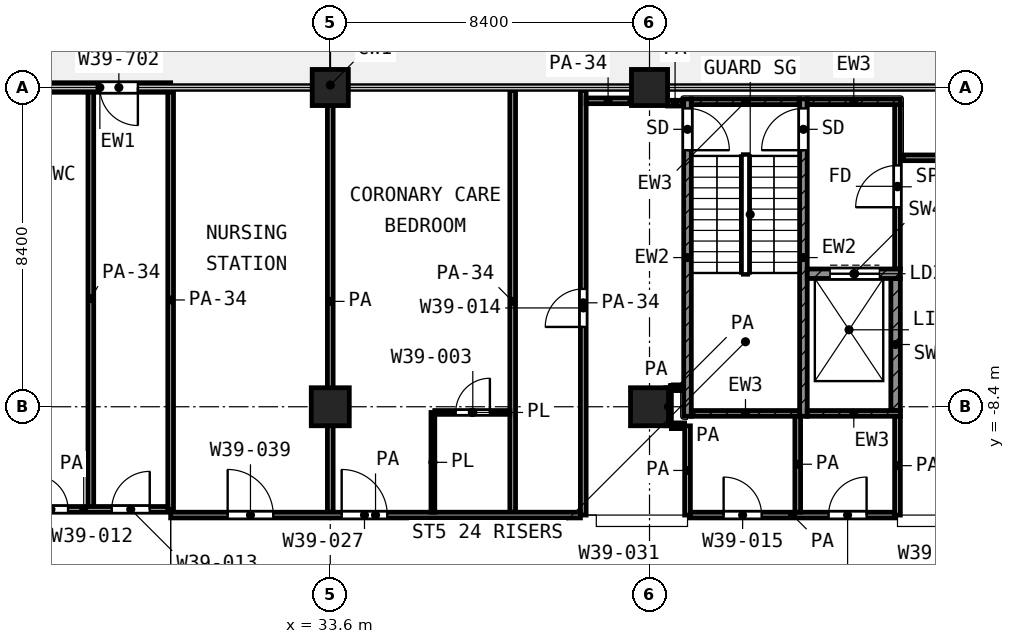
"""IFC4 building model, lengths in metres.
Left out: names, types, materials, properties, quantities, classifications, styles, units other than length and angle.
Written with IfcOpenShell. Run it as: python <this file> out.ifc"""

import sys

from ifc_helpers import new_model, si_unit, direction, frame, frame_2d, origin, origin_2d, place, context, subcontext, project, spatial, rectangle, extrude, element, fill, save


model = new_model("IFC4")
c1 = context("Model", 3, precision=1e-05, world=origin(), true_north=direction((0.0, 1.0)))
c2 = subcontext(c1, "Body", "Model", "MODEL_VIEW")
j1 = project(units=[si_unit("LENGTHUNIT", "METRE"), si_unit("PLANEANGLEUNIT", "RADIAN")], contexts=[c1])
p1 = place(None, origin())
s1 = spatial("IfcSite", under=j1, at=p1, CompositionType="ELEMENT")
p2 = place(p1, origin())
s2 = spatial("IfcBuilding", under=s1, at=p2, CompositionType="ELEMENT")
p3 = place(p2, frame((0.0, 0.0, 192.0)))
s3 = spatial("IfcBuildingStorey", under=s2, at=p3, CompositionType="ELEMENT", Elevation=192.0)
for number, where, z_axis, x_axis in (
    (1, (33.6, 0.0, 0.0), (0.0, 0.0, 1.0), (1.0, 0.0, 0.0)),
    (2, (42.0, 0.0, 0.0), (0.0, 0.0, 1.0), (1.0, 0.0, 0.0)),
):
    element("IfcColumn", number, at=place(p3, frame(where, z_axis=z_axis, x_axis=x_axis)), inside=s3, PredefinedType="COLUMN", context=c2, shape_type="SweptSolid", body=[
        extrude(rectangle(XDim=0.95, YDim=0.95, at=origin_2d()), origin(), (0.0, 0.0, 1.0), 4.2),
    ])
for number, where, z_axis, x_axis in (
    (3, (33.6, -8.4, 0.0), (0.0, 0.0, 1.0), (1.0, 0.0, 0.0)),
    (4, (42.0, -8.4, 0.0), (0.0, 0.0, 1.0), (1.0, 0.0, 0.0)),
):
    element("IfcColumn", number, at=place(p3, frame(where, z_axis=z_axis, x_axis=x_axis)), inside=s3, PredefinedType="COLUMN", context=c2, shape_type="SweptSolid", body=[
        extrude(rectangle(XDim=1.0, YDim=1.0, at=origin_2d()), origin(), (0.0, 0.0, 1.0), 4.2),
    ])
p4 = place(p3, frame((29.4, 0.0, 0.0), z_axis=(0.0, 0.0, 1.0), x_axis=(-1.0, 0.0, 0.0)))
e5 = element("IfcWall", 5, at=p4, inside=s3, PredefinedType="SOLIDWALL", context=c2, shape_type="SweptSolid", body=[
    extrude(rectangle(XDim=3.725, YDim=0.25, at=frame_2d((1.862, 0.0))), origin(), (0.0, 0.0, 1.0), 2.58),
])
p5 = place(p4, frame((0.863, 0.0, 0.0)))
e6 = element("IfcOpeningElement", 6, at=p5, cuts=e5, PredefinedType="OPENING", context=c2, shape_type="SweptSolid", body=[
    extrude(rectangle(XDim=1.0, YDim=2.1, at=frame_2d((0.5, 1.05))), frame((0.0, 0.135, 0.0), z_axis=(0.0, -1.0, 0.0), x_axis=(1.0, 0.0, 0.0)), (0.0, 0.0, 1.0), 0.27),
])
p6 = place(p3, frame((43.0, -8.65, 0.0), z_axis=(0.0, 0.0, 1.0), x_axis=(0.0, 1.0, 0.0)))
e7 = element("IfcWall", 7, at=p6, inside=s3, PredefinedType="SHEAR", context=c2, shape_type="SweptSolid", body=[
    extrude(rectangle(XDim=8.35, YDim=0.2, at=frame_2d((4.175, 0.0))), origin(), (0.0, 0.0, 1.0), 3.6),
])
p7 = place(p6, frame((7.0, 0.0, 0.0)))
e8 = element("IfcOpeningElement", 8, at=p7, cuts=e7, PredefinedType="OPENING", context=c2, shape_type="SweptSolid", body=[
    extrude(rectangle(XDim=1.1, YDim=2.1, at=frame_2d((0.55, 1.05))), frame((0.0, 0.11, 0.0), z_axis=(0.0, -1.0, 0.0), x_axis=(1.0, 0.0, 0.0)), (0.0, 0.0, 1.0), 0.22),
])
p8 = place(p3, frame((46.05, -8.65, 0.0), z_axis=(0.0, 0.0, 1.0), x_axis=(0.0, 1.0, 0.0)))
e9 = element("IfcWall", 9, at=p8, inside=s3, PredefinedType="SHEAR", context=c2, shape_type="SweptSolid", body=[
    extrude(rectangle(XDim=8.35, YDim=0.2, at=frame_2d((4.175, 0.0))), origin(), (0.0, 0.0, 1.0), 3.6),
])
p9 = place(p8, frame((7.0, 0.0, 0.0)))
e10 = element("IfcOpeningElement", 10, at=p9, cuts=e9, PredefinedType="OPENING", context=c2, shape_type="SweptSolid", body=[
    extrude(rectangle(XDim=1.1, YDim=2.1, at=frame_2d((0.55, 1.05))), frame((0.0, 0.11, 0.0), z_axis=(0.0, -1.0, 0.0), x_axis=(1.0, 0.0, 0.0)), (0.0, 0.0, 1.0), 0.22),
])
p10 = place(p3, frame((43.1, -0.375, 0.0), z_axis=(0.0, 0.0, 1.0), x_axis=(1.0, 0.0, 0.0)))
e11 = element("IfcWall", 11, at=p10, inside=s3, PredefinedType="SHEAR", context=c2, shape_type="SweptSolid", body=[
    extrude(rectangle(XDim=2.85, YDim=0.15, at=frame_2d((1.425, 0.0))), origin(), (0.0, 0.0, 1.0), 3.6),
])
p11 = place(p3, frame((46.15, -0.375, 0.0), z_axis=(0.0, 0.0, 1.0), x_axis=(1.0, 0.0, 0.0)))
e12 = element("IfcWall", 12, at=p11, inside=s3, PredefinedType="SHEAR", context=c2, shape_type="SweptSolid", body=[
    extrude(rectangle(XDim=2.45, YDim=0.15, at=frame_2d((1.225, 0.0))), origin(), (0.0, 0.0, 1.0), 3.6),
])
p12 = place(p3, frame((43.1, -8.575, 0.0), z_axis=(0.0, 0.0, 1.0), x_axis=(1.0, 0.0, 0.0)))
e13 = element("IfcWall", 13, at=p12, inside=s3, PredefinedType="SHEAR", context=c2, shape_type="SweptSolid", body=[
    extrude(rectangle(XDim=2.85, YDim=0.15, at=frame_2d((1.425, 0.0))), origin(), (0.0, 0.0, 1.0), 3.6),
])
p13 = place(p3, frame((46.15, -8.575, 0.0), z_axis=(0.0, 0.0, 1.0), x_axis=(1.0, 0.0, 0.0)))
e14 = element("IfcWall", 14, at=p13, inside=s3, PredefinedType="SHEAR", context=c2, shape_type="SweptSolid", body=[
    extrude(rectangle(XDim=2.45, YDim=0.15, at=frame_2d((1.225, 0.0))), origin(), (0.0, 0.0, 1.0), 3.6),
])
p14 = place(p3, frame((46.15, -4.9, 0.0), z_axis=(0.0, 0.0, 1.0), x_axis=(1.0, 0.0, 0.0)))
e15 = element("IfcWall", 15, at=p14, inside=s3, PredefinedType="SHEAR", context=c2, shape_type="SweptSolid", body=[
    extrude(rectangle(XDim=2.45, YDim=0.25, at=frame_2d((1.225, 0.0))), origin(), (0.0, 0.0, 1.0), 3.6),
])
p15 = place(p14, frame((0.6, 0.0, 0.0)))
e16 = element("IfcOpeningElement", 16, at=p15, cuts=e15, PredefinedType="OPENING", context=c2, shape_type="SweptSolid", body=[
    extrude(rectangle(XDim=1.3, YDim=2.1, at=frame_2d((0.65, 1.05))), frame((0.0, 0.135, 0.0), z_axis=(0.0, -1.0, 0.0), x_axis=(1.0, 0.0, 0.0)), (0.0, 0.0, 1.0), 0.27),
])
p16 = place(p3, frame((48.475, -8.5, 0.0), z_axis=(0.0, 0.0, 1.0), x_axis=(0.0, 1.0, 0.0)))
e17 = element("IfcWall", 17, at=p16, inside=s3, PredefinedType="SHEAR", context=c2, shape_type="SweptSolid", body=[
    extrude(rectangle(XDim=3.475, YDim=0.25, at=frame_2d((1.738, 0.0))), origin(), (0.0, 0.0, 1.0), 3.6),
])
p17 = place(p3, frame((48.525, -4.775, 0.0), z_axis=(0.0, 0.0, 1.0), x_axis=(0.0, 1.0, 0.0)))
e18 = element("IfcWall", 18, at=p17, inside=s3, PredefinedType="PARTITIONING", context=c2, shape_type="SweptSolid", body=[
    extrude(rectangle(XDim=4.325, YDim=0.15, at=frame_2d((2.163, 0.0))), origin(), (0.0, 0.0, 1.0), 3.6),
])
p18 = place(p17, frame((1.625, 0.0, 0.0)))
e19 = element("IfcOpeningElement", 19, at=p18, cuts=e18, PredefinedType="OPENING", context=c2, shape_type="SweptSolid", body=[
    extrude(rectangle(XDim=1.1, YDim=2.1, at=frame_2d((0.55, 1.05))), frame((0.0, 0.085, 0.0), z_axis=(0.0, -1.0, 0.0), x_axis=(1.0, 0.0, 0.0)), (0.0, 0.0, 1.0), 0.17),
])
p19 = place(p3, frame((36.35, -8.55, 0.0), z_axis=(0.0, 0.0, 1.0), x_axis=(1.0, 0.0, 0.0)))
e20 = element("IfcWall", 20, at=p19, inside=s3, PredefinedType="PARTITIONING", context=c2, shape_type="SweptSolid", body=[
    extrude(rectangle(XDim=1.975, YDim=0.1, at=frame_2d((0.987, 0.0))), origin(), (0.0, 0.0, 1.0), 3.6),
])
p20 = place(p19, frame((0.55, 0.0, 0.0)))
e21 = element("IfcOpeningElement", 21, at=p20, cuts=e20, PredefinedType="OPENING", context=c2, shape_type="SweptSolid", body=[
    extrude(rectangle(XDim=0.9, YDim=2.1, at=frame_2d((0.45, 1.05))), frame((0.0, 0.06, 0.0), z_axis=(0.0, -1.0, 0.0), x_axis=(1.0, 0.0, 0.0)), (0.0, 0.0, 1.0), 0.12),
])
p21 = place(p3, frame((36.3, -11.175, 0.0), z_axis=(0.0, 0.0, 1.0), x_axis=(0.0, 1.0, 0.0)))
e22 = element("IfcWall", 22, at=p21, inside=s3, PredefinedType="PARTITIONING", context=c2, shape_type="SweptSolid", body=[
    extrude(rectangle(XDim=2.625, YDim=0.1, at=frame_2d((1.312, 0.0))), origin(), (0.0, 0.0, 1.0), 3.6),
])
p22 = place(p3, frame((29.4, -11.25, 0.0), z_axis=(0.0, 0.0, 1.0), x_axis=(1.0, 0.0, 0.0)))
e23 = element("IfcWall", 23, at=p22, inside=s3, PredefinedType="PARTITIONING", context=c2, shape_type="SweptSolid", body=[
    extrude(rectangle(XDim=10.782, YDim=0.15, at=frame_2d((5.391, 0.0))), origin(), (0.0, 0.0, 1.0), 3.6),
])
p23 = place(p22, frame((4.5, 0.0, 0.0)))
e24 = element("IfcOpeningElement", 24, at=p23, cuts=e23, PredefinedType="OPENING", context=c2, shape_type="SweptSolid", body=[
    extrude(rectangle(XDim=1.2, YDim=2.1, at=frame_2d((0.6, 1.05))), frame((0.0, 0.085, 0.0), z_axis=(0.0, -1.0, 0.0), x_axis=(1.0, 0.0, 0.0)), (0.0, 0.0, 1.0), 0.17),
])
p24 = place(p22, frame((1.5, 0.0, 0.0)))
e25 = element("IfcOpeningElement", 25, at=p24, cuts=e23, PredefinedType="OPENING", context=c2, shape_type="SweptSolid", body=[
    extrude(rectangle(XDim=1.2, YDim=2.1, at=frame_2d((0.6, 1.05))), frame((0.0, 0.085, 0.0), z_axis=(0.0, -1.0, 0.0), x_axis=(1.0, 0.0, 0.0)), (0.0, 0.0, 1.0), 0.17),
])
p25 = place(p3, frame((43.075, -11.25, 0.0), z_axis=(0.0, 0.0, 1.0), x_axis=(1.0, 0.0, 0.0)))
e26 = element("IfcWall", 26, at=p25, inside=s3, PredefinedType="PARTITIONING", context=c2, shape_type="SweptSolid", body=[
    extrude(rectangle(XDim=5.375, YDim=0.15, at=frame_2d((2.688, 0.0))), origin(), (0.0, 0.0, 1.0), 3.6),
])
p26 = place(p25, frame((0.875, 0.0, 0.0)))
e27 = element("IfcOpeningElement", 27, at=p26, cuts=e26, PredefinedType="OPENING", context=c2, shape_type="SweptSolid", body=[
    extrude(rectangle(XDim=1.0, YDim=2.1, at=frame_2d((0.5, 1.05))), frame((0.0, 0.085, 0.0), z_axis=(0.0, -1.0, 0.0), x_axis=(1.0, 0.0, 0.0)), (0.0, 0.0, 1.0), 0.17),
])
p27 = place(p25, frame((3.637, 0.0, 0.0)))
e28 = element("IfcOpeningElement", 28, at=p27, cuts=e26, PredefinedType="OPENING", context=c2, shape_type="SweptSolid", body=[
    extrude(rectangle(XDim=1.0, YDim=2.1, at=frame_2d((0.5, 1.05))), frame((0.0, 0.085, 0.0), z_axis=(0.0, -1.0, 0.0), x_axis=(1.0, 0.0, 0.0)), (0.0, 0.0, 1.0), 0.17),
])
p28 = place(p3, frame((24.9, -11.1, 0.0), z_axis=(0.0, 0.0, 1.0), x_axis=(1.0, 0.0, 0.0)))
e29 = element("IfcWall", 29, at=p28, inside=s3, PredefinedType="PARTITIONING", context=c2, shape_type="SweptSolid", body=[
    extrude(rectangle(XDim=4.425, YDim=0.15, at=frame_2d((2.212, 0.0))), origin(), (0.0, 0.0, 1.0), 3.6),
])
p29 = place(p28, frame((0.9, 0.0, 0.0)))
e30 = element("IfcOpeningElement", 30, at=p29, cuts=e29, PredefinedType="OPENING", context=c2, shape_type="SweptSolid", body=[
    extrude(rectangle(XDim=0.9, YDim=2.1, at=frame_2d((0.45, 1.05))), frame((0.0, 0.085, 0.0), z_axis=(0.0, -1.0, 0.0), x_axis=(1.0, 0.0, 0.0)), (0.0, 0.0, 1.0), 0.17),
])
p30 = place(p28, frame((2.95, 0.0, 0.0)))
e31 = element("IfcOpeningElement", 31, at=p30, cuts=e29, PredefinedType="OPENING", context=c2, shape_type="SweptSolid", body=[
    extrude(rectangle(XDim=1.0, YDim=2.1, at=frame_2d((0.5, 1.05))), frame((0.0, 0.085, 0.0), z_axis=(0.0, -1.0, 0.0), x_axis=(1.0, 0.0, 0.0)), (0.0, 0.0, 1.0), 0.17),
])
p31 = place(p3, frame((42.576, -8.9, 0.0), z_axis=(0.0, 0.0, 1.0), x_axis=(1.0, 0.0, 0.0)))
e32 = element("IfcWall", 32, at=p31, inside=s3, PredefinedType="PARTITIONING", context=c2, shape_type="SweptSolid", body=[
    extrude(rectangle(XDim=0.347, YDim=0.15, at=frame_2d((0.174, 0.0))), origin(), (0.0, 0.0, 1.0), 3.6),
])
p32 = place(p3, frame((42.576, -7.9, 0.0), z_axis=(0.0, 0.0, 1.0), x_axis=(1.0, 0.0, 0.0)))
e33 = element("IfcWall", 33, at=p32, inside=s3, PredefinedType="PARTITIONING", context=c2, shape_type="SweptSolid", body=[
    extrude(rectangle(XDim=0.244, YDim=0.15, at=frame_2d((0.122, 0.0))), origin(), (0.0, 0.0, 1.0), 3.6),
])
p33 = place(p3, frame((48.68, -1.85, 0.0), z_axis=(0.0, 0.0, 1.0), x_axis=(1.0, 0.0, 0.0)))
e34 = element("IfcWall", 34, at=p33, inside=s3, PredefinedType="PARTITIONING", context=c2, shape_type="SweptSolid", body=[
    extrude(rectangle(XDim=3.387, YDim=0.15, at=frame_2d((1.693, 0.0))), origin(), (0.0, 0.0, 1.0), 3.6),
])
p34 = place(p3, frame((42.475, -0.412, 0.0), z_axis=(0.0, 0.0, 1.0), x_axis=(1.0, 0.0, 0.0)))
e35 = element("IfcWall", 35, at=p34, inside=s3, PredefinedType="PARTITIONING", context=c2, shape_type="SweptSolid", body=[
    extrude(rectangle(XDim=0.395, YDim=0.15, at=frame_2d((0.198, 0.0))), origin(), (0.0, 0.0, 1.0), 3.6),
])
p35 = place(p3, frame((40.332, -0.35, 0.0), z_axis=(0.0, 0.0, 1.0), x_axis=(1.0, 0.0, 0.0)))
e36 = element("IfcWall", 36, at=p35, inside=s3, PredefinedType="PARTITIONING", context=c2, shape_type="SweptSolid", body=[
    extrude(rectangle(XDim=1.156, YDim=0.15, at=frame_2d((0.578, 0.0))), origin(), (0.0, 0.0, 1.0), 2.7),
])
p36 = place(p3, frame((27.3, -11.025, 0.0), z_axis=(0.0, 0.0, 1.0), x_axis=(0.0, 1.0, 0.0)))
e37 = element("IfcWall", 37, at=p36, inside=s3, PredefinedType="PARTITIONING", context=c2, shape_type="SweptSolid", body=[
    extrude(rectangle(XDim=10.945, YDim=0.15, at=frame_2d((5.472, 0.0))), origin(), (0.0, 0.0, 1.0), 2.7),
])
p37 = place(p3, frame((29.4, -11.1, 0.0), z_axis=(0.0, 0.0, 1.0), x_axis=(0.0, 1.0, 0.0)))
e38 = element("IfcWall", 38, at=p37, inside=s3, PredefinedType="PARTITIONING", context=c2, shape_type="SweptSolid", body=[
    extrude(rectangle(XDim=11.02, YDim=0.15, at=frame_2d((5.51, 0.0))), origin(), (0.0, 0.0, 1.0), 2.7),
])
p38 = place(p3, frame((33.6, -11.175, 0.0), z_axis=(0.0, 0.0, 1.0), x_axis=(0.0, 1.0, 0.0)))
e39 = element("IfcWall", 39, at=p38, inside=s3, PredefinedType="PARTITIONING", context=c2, shape_type="SweptSolid", body=[
    extrude(rectangle(XDim=11.095, YDim=0.15, at=frame_2d((5.547, 0.0))), origin(), (0.0, 0.0, 1.0), 3.6),
])
p39 = place(p3, frame((38.4, -11.175, 0.0), z_axis=(0.0, 0.0, 1.0), x_axis=(0.0, 1.0, 0.0)))
e40 = element("IfcWall", 40, at=p39, inside=s3, PredefinedType="PARTITIONING", context=c2, shape_type="SweptSolid", body=[
    extrude(rectangle(XDim=11.095, YDim=0.15, at=frame_2d((5.547, 0.0))), origin(), (0.0, 0.0, 1.0), 2.7),
])
p40 = place(p3, frame((40.257, -11.25, 0.0), z_axis=(0.0, 0.0, 1.0), x_axis=(0.0, 1.0, 0.0)))
e41 = element("IfcWall", 41, at=p40, inside=s3, PredefinedType="PARTITIONING", context=c2, shape_type="SweptSolid", body=[
    extrude(rectangle(XDim=11.17, YDim=0.15, at=frame_2d((5.585, 0.0))), origin(), (0.0, 0.0, 1.0), 2.7),
])
p41 = place(p40, frame((4.95, 0.0, 0.0)))
e42 = element("IfcOpeningElement", 42, at=p41, cuts=e41, PredefinedType="OPENING", context=c2, shape_type="SweptSolid", body=[
    extrude(rectangle(XDim=1.0, YDim=2.1, at=frame_2d((0.5, 1.05))), frame((0.0, 0.085, 0.0), z_axis=(0.0, -1.0, 0.0), x_axis=(1.0, 0.0, 0.0)), (0.0, 0.0, 1.0), 0.17),
])
p42 = place(p3, frame((42.5, -8.899, 0.0), z_axis=(0.0, 0.0, 1.0), x_axis=(0.0, 1.0, 0.0)))
e43 = element("IfcWall", 43, at=p42, inside=s3, PredefinedType="PARTITIONING", context=c2, shape_type="SweptSolid", body=[
    extrude(rectangle(XDim=0.998, YDim=0.15, at=frame_2d((0.499, 0.0))), origin(), (0.0, 0.0, 1.0), 3.6),
])
p43 = place(p3, frame((43.0, -11.25, 0.0), z_axis=(0.0, 0.0, 1.0), x_axis=(0.0, 1.0, 0.0)))
e44 = element("IfcWall", 44, at=p43, inside=s3, PredefinedType="PARTITIONING", context=c2, shape_type="SweptSolid", body=[
    extrude(rectangle(XDim=2.348, YDim=0.15, at=frame_2d((1.174, 0.0))), origin(), (0.0, 0.0, 1.0), 3.6),
])
p44 = place(p3, frame((45.9, -11.175, 0.0), z_axis=(0.0, 0.0, 1.0), x_axis=(0.0, 1.0, 0.0)))
e45 = element("IfcWall", 45, at=p44, inside=s3, PredefinedType="PARTITIONING", context=c2, shape_type="SweptSolid", body=[
    extrude(rectangle(XDim=2.525, YDim=0.15, at=frame_2d((1.263, 0.0))), origin(), (0.0, 0.0, 1.0), 3.6),
])
p45 = place(p3, frame((48.525, -11.25, 0.0), z_axis=(0.0, 0.0, 1.0), x_axis=(0.0, 1.0, 0.0)))
e46 = element("IfcWall", 46, at=p45, inside=s3, PredefinedType="PARTITIONING", context=c2, shape_type="SweptSolid", body=[
    extrude(rectangle(XDim=2.6, YDim=0.15, at=frame_2d((1.3, 0.0))), origin(), (0.0, 0.0, 1.0), 3.6),
])
p46 = place(p5, origin())
e47 = element("IfcDoor", 47, at=p46, inside=s3, OperationType="SINGLE_SWING_LEFT", PredefinedType="DOOR", context=c2, shape_type="SweptSolid", body=[
    extrude(rectangle(XDim=1.0, YDim=2.1, at=frame_2d((0.5, 1.05))), frame((0.0, 0.025, 0.0), z_axis=(0.0, -1.0, 0.0), x_axis=(1.0, 0.0, 0.0)), (0.0, 0.0, 1.0), 0.05),
])
fill(e6, e47)
p47 = place(p7, frame((1.1, 0.0, 0.0), z_axis=(0.0, 0.0, 1.0), x_axis=(-1.0, 0.0, 0.0)))
e48 = element("IfcDoor", 48, at=p47, inside=s3, OperationType="SINGLE_SWING_LEFT", PredefinedType="DOOR", context=c2, shape_type="SweptSolid", body=[
    extrude(rectangle(XDim=1.1, YDim=2.1, at=frame_2d((0.55, 1.05))), frame((0.0, 0.025, 0.0), z_axis=(0.0, -1.0, 0.0), x_axis=(1.0, 0.0, 0.0)), (0.0, 0.0, 1.0), 0.05),
])
fill(e8, e48)
p48 = place(p9, origin())
e49 = element("IfcDoor", 49, at=p48, inside=s3, OperationType="SINGLE_SWING_LEFT", PredefinedType="DOOR", context=c2, shape_type="SweptSolid", body=[
    extrude(rectangle(XDim=1.1, YDim=2.1, at=frame_2d((0.55, 1.05))), frame((0.0, 0.025, 0.0), z_axis=(0.0, -1.0, 0.0), x_axis=(1.0, 0.0, 0.0)), (0.0, 0.0, 1.0), 0.05),
])
fill(e10, e49)
p49 = place(p15, origin())
e50 = element("IfcDoor", 50, at=p49, inside=s3, OperationType="DOUBLE_DOOR_SLIDING", PredefinedType="DOOR", context=c2, shape_type="SweptSolid", body=[
    extrude(rectangle(XDim=1.3, YDim=2.1, at=frame_2d((0.65, 1.05))), frame((0.0, 0.025, 0.0), z_axis=(0.0, -1.0, 0.0), x_axis=(1.0, 0.0, 0.0)), (0.0, 0.0, 1.0), 0.05),
])
fill(e16, e50)
p50 = place(p18, origin())
e51 = element("IfcDoor", 51, at=p50, inside=s3, OperationType="SINGLE_SWING_LEFT", PredefinedType="DOOR", context=c2, shape_type="SweptSolid", body=[
    extrude(rectangle(XDim=1.1, YDim=2.1, at=frame_2d((0.55, 1.05))), frame((0.0, 0.025, 0.0), z_axis=(0.0, -1.0, 0.0), x_axis=(1.0, 0.0, 0.0)), (0.0, 0.0, 1.0), 0.05),
])
fill(e19, e51)
p51 = place(p23, origin())
e52 = element("IfcDoor", 52, at=p51, inside=s3, OperationType="SINGLE_SWING_LEFT", PredefinedType="DOOR", context=c2, shape_type="SweptSolid", body=[
    extrude(rectangle(XDim=1.2, YDim=2.1, at=frame_2d((0.6, 1.05))), frame((0.0, 0.025, 0.0), z_axis=(0.0, -1.0, 0.0), x_axis=(1.0, 0.0, 0.0)), (0.0, 0.0, 1.0), 0.05),
])
fill(e24, e52)
p52 = place(p20, origin())
e53 = element("IfcDoor", 53, at=p52, inside=s3, OperationType="SINGLE_SWING_RIGHT", PredefinedType="DOOR", context=c2, shape_type="SweptSolid", body=[
    extrude(rectangle(XDim=0.9, YDim=2.1, at=frame_2d((0.45, 1.05))), frame((0.0, 0.025, 0.0), z_axis=(0.0, -1.0, 0.0), x_axis=(1.0, 0.0, 0.0)), (0.0, 0.0, 1.0), 0.05),
])
fill(e21, e53)
p53 = place(p41, origin())
e54 = element("IfcDoor", 54, at=p53, inside=s3, OperationType="SINGLE_SWING_LEFT", PredefinedType="DOOR", context=c2, shape_type="SweptSolid", body=[
    extrude(rectangle(XDim=1.0, YDim=2.1, at=frame_2d((0.5, 1.05))), frame((0.0, 0.025, 0.0), z_axis=(0.0, -1.0, 0.0), x_axis=(1.0, 0.0, 0.0)), (0.0, 0.0, 1.0), 0.05),
])
fill(e42, e54)
p54 = place(p26, origin())
e55 = element("IfcDoor", 55, at=p54, inside=s3, OperationType="SINGLE_SWING_LEFT", PredefinedType="DOOR", context=c2, shape_type="SweptSolid", body=[
    extrude(rectangle(XDim=1.0, YDim=2.1, at=frame_2d((0.5, 1.05))), frame((0.0, 0.025, 0.0), z_axis=(0.0, -1.0, 0.0), x_axis=(1.0, 0.0, 0.0)), (0.0, 0.0, 1.0), 0.05),
])
fill(e27, e55)
p55 = place(p27, origin())
e56 = element("IfcDoor", 56, at=p55, inside=s3, OperationType="SINGLE_SWING_RIGHT", PredefinedType="DOOR", context=c2, shape_type="SweptSolid", body=[
    extrude(rectangle(XDim=1.0, YDim=2.1, at=frame_2d((0.5, 1.05))), frame((0.0, 0.025, 0.0), z_axis=(0.0, -1.0, 0.0), x_axis=(1.0, 0.0, 0.0)), (0.0, 0.0, 1.0), 0.05),
])
fill(e28, e56)
p56 = place(p29, origin())
e57 = element("IfcDoor", 57, at=p56, inside=s3, OperationType="SINGLE_SWING_LEFT", PredefinedType="DOOR", context=c2, shape_type="SweptSolid", body=[
    extrude(rectangle(XDim=0.9, YDim=2.1, at=frame_2d((0.45, 1.05))), frame((0.0, 0.025, 0.0), z_axis=(0.0, -1.0, 0.0), x_axis=(1.0, 0.0, 0.0)), (0.0, 0.0, 1.0), 0.05),
])
fill(e30, e57)
p57 = place(p30, origin())
e58 = element("IfcDoor", 58, at=p57, inside=s3, OperationType="SINGLE_SWING_RIGHT", PredefinedType="DOOR", context=c2, shape_type="SweptSolid", body=[
    extrude(rectangle(XDim=1.0, YDim=2.1, at=frame_2d((0.5, 1.05))), frame((0.0, 0.025, 0.0), z_axis=(0.0, -1.0, 0.0), x_axis=(1.0, 0.0, 0.0)), (0.0, 0.0, 1.0), 0.05),
])
fill(e31, e58)
p58 = place(p24, origin())
e59 = element("IfcDoor", 59, at=p58, inside=s3, OperationType="SINGLE_SWING_LEFT", PredefinedType="DOOR", context=c2, shape_type="SweptSolid", body=[
    extrude(rectangle(XDim=1.2, YDim=2.1, at=frame_2d((0.6, 1.05))), frame((0.0, 0.025, 0.0), z_axis=(0.0, -1.0, 0.0), x_axis=(1.0, 0.0, 0.0)), (0.0, 0.0, 1.0), 0.05),
])
fill(e25, e59)
save(model, sys.argv[1])
